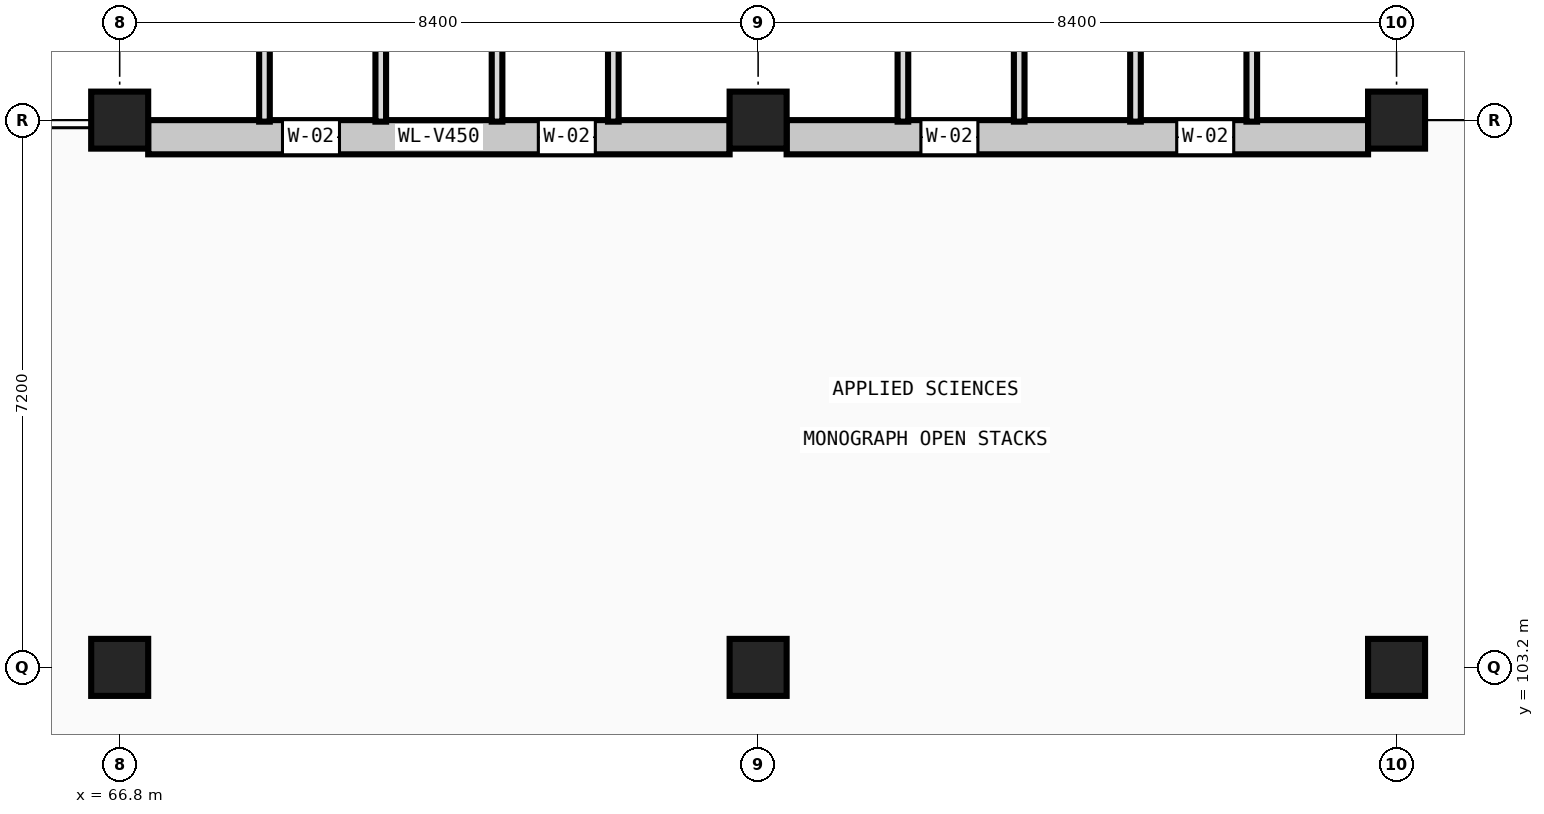
"""IFC4 building model, lengths in metres.
Left out: names, types, materials, properties, quantities, classifications, styles, units other than length and angle.
Written with IfcOpenShell. Run it as: python <this file> out.ifc"""

import sys

from ifc_helpers import new_model, si_unit, direction, frame, frame_2d, origin, origin_2d, place, context, subcontext, project, spatial, rectangle, extrude, element, fill, save


model = new_model("IFC4")
c1 = context("Model", 3, precision=1e-05, world=origin(), true_north=direction((0.0, 1.0)))
c2 = subcontext(c1, "Body", "Model", "MODEL_VIEW")
j1 = project(units=[si_unit("LENGTHUNIT", "METRE"), si_unit("PLANEANGLEUNIT", "RADIAN")], contexts=[c1])
p1 = place(None, origin())
s1 = spatial("IfcSite", under=j1, at=p1, CompositionType="ELEMENT")
p2 = place(p1, origin())
s2 = spatial("IfcBuilding", under=s1, at=p2, CompositionType="ELEMENT")
p3 = place(p2, frame((0.0, 0.0, 18.88)))
s3 = spatial("IfcBuildingStorey", under=s2, at=p3, CompositionType="ELEMENT", Elevation=18.88)
for number, where, z_axis, x_axis in (
    (1, (66.8, 103.2, 0.0), (0.0, 0.0, 1.0), (1.0, 0.0, 0.0)),
    (2, (66.8, 110.4, 0.0), (0.0, 0.0, 1.0), (1.0, 0.0, 0.0)),
    (3, (75.2, 103.2, 0.0), (0.0, 0.0, 1.0), (1.0, 0.0, 0.0)),
    (4, (75.2, 110.4, 0.0), (0.0, 0.0, 1.0), (1.0, 0.0, 0.0)),
    (5, (83.6, 103.2, 0.0), (0.0, 0.0, 1.0), (1.0, 0.0, 0.0)),
    (6, (83.6, 110.4, 0.0), (0.0, 0.0, 1.0), (1.0, 0.0, 0.0)),
):
    element("IfcColumn", number, at=place(p3, frame(where, z_axis=z_axis, x_axis=x_axis)), inside=s3, PredefinedType="COLUMN", context=c2, shape_type="SweptSolid", body=[
        extrude(rectangle(XDim=0.75, YDim=0.75, at=origin_2d()), origin(), (0.0, 0.0, 1.0), 4.48),
    ])
p4 = place(p3, frame((67.175, 110.175, 0.0), z_axis=(0.0, 0.0, 1.0), x_axis=(1.0, 0.0, 0.0)))
e7 = element("IfcWall", 7, at=p4, inside=s3, PredefinedType="SOLIDWALL", context=c2, shape_type="SweptSolid", body=[
    extrude(rectangle(XDim=7.65, YDim=0.45, at=frame_2d((3.825, 0.0))), origin(), (0.0, 0.0, 1.0), 3.53),
])
p5 = place(p4, frame((1.767, 0.0, 0.9)))
e8 = element("IfcOpeningElement", 8, at=p5, cuts=e7, PredefinedType="OPENING", context=c2, shape_type="SweptSolid", body=[
    extrude(rectangle(XDim=0.75, YDim=2.4, at=frame_2d((0.375, 1.2))), frame((0.0, 0.235, 0.0), z_axis=(0.0, -1.0, 0.0), x_axis=(1.0, 0.0, 0.0)), (0.0, 0.0, 1.0), 0.47),
])
p6 = place(p4, frame((5.133, 0.0, 0.9)))
e9 = element("IfcOpeningElement", 9, at=p6, cuts=e7, PredefinedType="OPENING", context=c2, shape_type="SweptSolid", body=[
    extrude(rectangle(XDim=0.75, YDim=2.4, at=frame_2d((0.375, 1.2))), frame((0.0, 0.235, 0.0), z_axis=(0.0, -1.0, 0.0), x_axis=(1.0, 0.0, 0.0)), (0.0, 0.0, 1.0), 0.47),
])
p7 = place(p3, frame((75.575, 110.175, 0.0), z_axis=(0.0, 0.0, 1.0), x_axis=(1.0, 0.0, 0.0)))
e10 = element("IfcWall", 10, at=p7, inside=s3, PredefinedType="SOLIDWALL", context=c2, shape_type="SweptSolid", body=[
    extrude(rectangle(XDim=7.65, YDim=0.45, at=frame_2d((3.825, 0.0))), origin(), (0.0, 0.0, 1.0), 3.53),
])
p8 = place(p7, frame((1.767, 0.0, 0.9)))
e11 = element("IfcOpeningElement", 11, at=p8, cuts=e10, PredefinedType="OPENING", context=c2, shape_type="SweptSolid", body=[
    extrude(rectangle(XDim=0.75, YDim=2.4, at=frame_2d((0.375, 1.2))), frame((0.0, 0.235, 0.0), z_axis=(0.0, -1.0, 0.0), x_axis=(1.0, 0.0, 0.0)), (0.0, 0.0, 1.0), 0.47),
])
p9 = place(p7, frame((5.133, 0.0, 0.9)))
e12 = element("IfcOpeningElement", 12, at=p9, cuts=e10, PredefinedType="OPENING", context=c2, shape_type="SweptSolid", body=[
    extrude(rectangle(XDim=0.75, YDim=2.4, at=frame_2d((0.375, 1.2))), frame((0.0, 0.235, 0.0), z_axis=(0.0, -1.0, 0.0), x_axis=(1.0, 0.0, 0.0)), (0.0, 0.0, 1.0), 0.47),
])
p10 = place(p5, origin())
e13 = element("IfcWindow", 13, at=p10, inside=s3, PartitioningType="SINGLE_PANEL", PredefinedType="WINDOW", context=c2, shape_type="SweptSolid", body=[
    extrude(rectangle(XDim=0.75, YDim=2.4, at=frame_2d((0.375, 1.2))), frame((0.0, 0.03, 0.0), z_axis=(0.0, -1.0, 0.0), x_axis=(1.0, 0.0, 0.0)), (0.0, 0.0, 1.0), 0.06),
])
fill(e8, e13)
p11 = place(p6, origin())
e14 = element("IfcWindow", 14, at=p11, inside=s3, PartitioningType="SINGLE_PANEL", PredefinedType="WINDOW", context=c2, shape_type="SweptSolid", body=[
    extrude(rectangle(XDim=0.75, YDim=2.4, at=frame_2d((0.375, 1.2))), frame((0.0, 0.03, 0.0), z_axis=(0.0, -1.0, 0.0), x_axis=(1.0, 0.0, 0.0)), (0.0, 0.0, 1.0), 0.06),
])
fill(e9, e14)
p12 = place(p8, origin())
e15 = element("IfcWindow", 15, at=p12, inside=s3, PartitioningType="SINGLE_PANEL", PredefinedType="WINDOW", context=c2, shape_type="SweptSolid", body=[
    extrude(rectangle(XDim=0.75, YDim=2.4, at=frame_2d((0.375, 1.2))), frame((0.0, 0.03, 0.0), z_axis=(0.0, -1.0, 0.0), x_axis=(1.0, 0.0, 0.0)), (0.0, 0.0, 1.0), 0.06),
])
fill(e11, e15)
p13 = place(p9, origin())
e16 = element("IfcWindow", 16, at=p13, inside=s3, PartitioningType="SINGLE_PANEL", PredefinedType="WINDOW", context=c2, shape_type="SweptSolid", body=[
    extrude(rectangle(XDim=0.75, YDim=2.4, at=frame_2d((0.375, 1.2))), frame((0.0, 0.03, 0.0), z_axis=(0.0, -1.0, 0.0), x_axis=(1.0, 0.0, 0.0)), (0.0, 0.0, 1.0), 0.06),
])
fill(e12, e16)
save(model, sys.argv[1])
